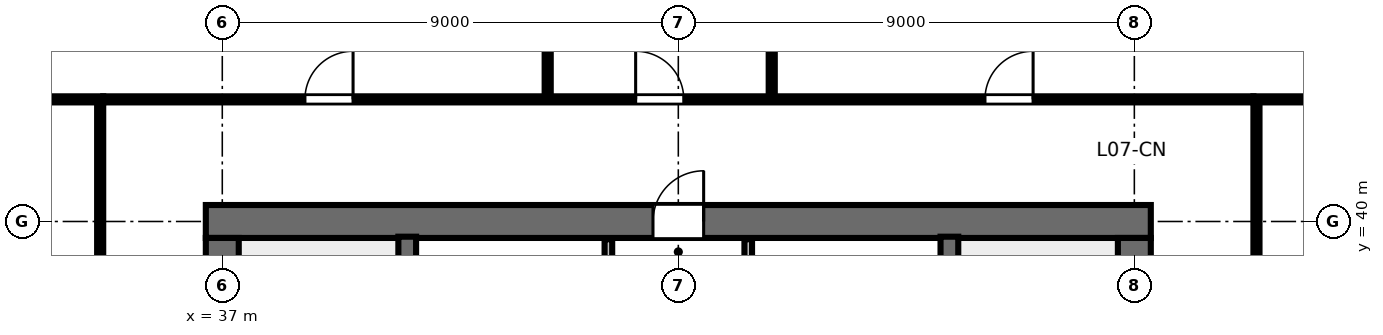
"""IFC4 building model, lengths in metres.
Left out: names, types, materials, properties, quantities, classifications, styles, units other than length and angle.
Written with IfcOpenShell. Run it as: python <this file> out.ifc"""

import sys

from ifc_helpers import new_model, si_unit, direction, frame, frame_2d, origin, place, context, subcontext, project, spatial, rectangle, extrude, element, fill, save


model = new_model("IFC4")
c1 = context("Model", 3, precision=1e-05, world=origin(), true_north=direction((0.0, 1.0)))
c2 = subcontext(c1, "Body", "Model", "MODEL_VIEW")
j1 = project(units=[si_unit("LENGTHUNIT", "METRE"), si_unit("PLANEANGLEUNIT", "RADIAN")], contexts=[c1])
p1 = place(None, origin())
s1 = spatial("IfcSite", under=j1, at=p1, CompositionType="ELEMENT")
p2 = place(p1, origin())
s2 = spatial("IfcBuilding", under=s1, at=p2, CompositionType="ELEMENT")
p3 = place(p2, frame((0.0, 0.0, 31.6)))
s3 = spatial("IfcBuildingStorey", under=s2, at=p3, CompositionType="ELEMENT", Elevation=31.6)
p4 = place(p3, frame((36.675, 40.0, 0.0), z_axis=(0.0, 0.0, 1.0), x_axis=(1.0, 0.0, 0.0)))
e1 = element("IfcWall", 1, at=p4, inside=s3, PredefinedType="SHEAR", context=c2, shape_type="SweptSolid", body=[
    extrude(rectangle(XDim=18.65, YDim=0.65, at=frame_2d((9.325, 0.0))), origin(), (0.0, 0.0, 1.0), 3.36),
])
p5 = place(p4, frame((8.825, 0.0, 0.0)))
e2 = element("IfcOpeningElement", 2, at=p5, cuts=e1, PredefinedType="OPENING", context=c2, shape_type="SweptSolid", body=[
    extrude(rectangle(XDim=1.0, YDim=2.15, at=frame_2d((0.5, 1.075))), frame((0.0, 0.335, 0.0), z_axis=(0.0, -1.0, 0.0), x_axis=(1.0, 0.0, 0.0)), (0.0, 0.0, 1.0), 0.67),
])
p6 = place(p3, frame((37.0, 24.325, 0.0), z_axis=(0.0, 0.0, 1.0), x_axis=(0.0, 1.0, 0.0)))
e3 = element("IfcWall", 3, at=p6, inside=s3, PredefinedType="SHEAR", context=c2, shape_type="SweptSolid", body=[
    extrude(rectangle(XDim=15.35, YDim=0.65, at=frame_2d((7.675, 0.0))), origin(), (0.0, 0.0, 1.0), 3.36),
])
p7 = place(p6, frame((5.2, 0.0, 0.0)))
e4 = element("IfcOpeningElement", 4, at=p7, cuts=e3, PredefinedType="OPENING", context=c2, shape_type="SweptSolid", body=[
    extrude(rectangle(XDim=1.15, YDim=2.15, at=frame_2d((0.575, 1.075))), frame((0.0, 0.335, 0.0), z_axis=(0.0, -1.0, 0.0), x_axis=(1.0, 0.0, 0.0)), (0.0, 0.0, 1.0), 0.67),
])
p8 = place(p3, frame((55.0, 24.325, 0.0), z_axis=(0.0, 0.0, 1.0), x_axis=(0.0, 1.0, 0.0)))
e5 = element("IfcWall", 5, at=p8, inside=s3, PredefinedType="SHEAR", context=c2, shape_type="SweptSolid", body=[
    extrude(rectangle(XDim=15.35, YDim=0.65, at=frame_2d((7.675, 0.0))), origin(), (0.0, 0.0, 1.0), 3.36),
])
p9 = place(p8, frame((5.2, 0.0, 0.0)))
e6 = element("IfcOpeningElement", 6, at=p9, cuts=e5, PredefinedType="OPENING", context=c2, shape_type="SweptSolid", body=[
    extrude(rectangle(XDim=1.15, YDim=2.15, at=frame_2d((0.575, 1.075))), frame((0.0, 0.335, 0.0), z_axis=(0.0, -1.0, 0.0), x_axis=(1.0, 0.0, 0.0)), (0.0, 0.0, 1.0), 0.67),
])
for number, where, z_axis, x_axis in (
    (7, (40.65, 32.0, 0.0), (0.0, 0.0, 1.0), (0.0, 1.0, 0.0)),
    (8, (51.35, 32.0, 0.0), (0.0, 0.0, 1.0), (0.0, 1.0, 0.0)),
):
    element("IfcWall", number, at=place(p3, frame(where, z_axis=z_axis, x_axis=x_axis)), inside=s3, PredefinedType="SHEAR", context=c2, shape_type="SweptSolid", body=[
        extrude(rectangle(XDim=7.7, YDim=0.35, at=frame_2d((3.85, 0.0))), origin(), (0.0, 0.0, 1.0), 3.6),
    ])
p10 = place(p3, frame((44.62, 35.72, 0.0), z_axis=(0.0, 0.0, 1.0), x_axis=(0.0, 1.0, 0.0)))
e9 = element("IfcWall", 9, at=p10, inside=s3, PredefinedType="PARTITIONING", context=c2, shape_type="SweptSolid", body=[
    extrude(rectangle(XDim=3.93, YDim=0.15, at=frame_2d((1.965, 0.0))), origin(), (0.0, 0.0, 1.0), 3.15),
])
p11 = place(p10, frame((1.5, 0.0, 0.0)))
e10 = element("IfcOpeningElement", 10, at=p11, cuts=e9, PredefinedType="OPENING", context=c2, shape_type="SweptSolid", body=[
    extrude(rectangle(XDim=0.9, YDim=2.15, at=frame_2d((0.45, 1.075))), frame((0.0, 0.085, 0.0), z_axis=(0.0, -1.0, 0.0), x_axis=(1.0, 0.0, 0.0)), (0.0, 0.0, 1.0), 0.17),
])
p12 = place(p3, frame((47.38, 35.72, 0.0), z_axis=(0.0, 0.0, 1.0), x_axis=(0.0, 1.0, 0.0)))
e11 = element("IfcWall", 11, at=p12, inside=s3, PredefinedType="PARTITIONING", context=c2, shape_type="SweptSolid", body=[
    extrude(rectangle(XDim=3.93, YDim=0.15, at=frame_2d((1.965, 0.0))), origin(), (0.0, 0.0, 1.0), 3.15),
])
p13 = place(p12, frame((1.5, 0.0, 0.0)))
e12 = element("IfcOpeningElement", 12, at=p13, cuts=e11, PredefinedType="OPENING", context=c2, shape_type="SweptSolid", body=[
    extrude(rectangle(XDim=0.9, YDim=2.15, at=frame_2d((0.45, 1.075))), frame((0.0, 0.085, 0.0), z_axis=(0.0, -1.0, 0.0), x_axis=(1.0, 0.0, 0.0)), (0.0, 0.0, 1.0), 0.17),
])
p14 = place(p3, frame((43.422, 42.41, 0.0), z_axis=(0.0, 0.0, 1.0), x_axis=(0.0, 1.0, 0.0)))
e13 = element("IfcWall", 13, at=p14, inside=s3, PredefinedType="PARTITIONING", context=c2, shape_type="SweptSolid", body=[
    extrude(rectangle(XDim=10.21, YDim=0.12, at=frame_2d((5.105, 0.0))), origin(), (0.0, 0.0, 1.0), 2.43),
])
p15 = place(p14, frame((1.4, 0.0, 0.0)))
e14 = element("IfcOpeningElement", 14, at=p15, cuts=e13, PredefinedType="OPENING", context=c2, shape_type="SweptSolid", body=[
    extrude(rectangle(XDim=0.9, YDim=2.15, at=frame_2d((0.45, 1.075))), frame((0.0, 0.07, 0.0), z_axis=(0.0, -1.0, 0.0), x_axis=(1.0, 0.0, 0.0)), (0.0, 0.0, 1.0), 0.14),
])
p16 = place(p3, frame((47.844, 42.41, 0.0), z_axis=(0.0, 0.0, 1.0), x_axis=(0.0, 1.0, 0.0)))
e15 = element("IfcWall", 15, at=p16, inside=s3, PredefinedType="PARTITIONING", context=c2, shape_type="SweptSolid", body=[
    extrude(rectangle(XDim=10.21, YDim=0.12, at=frame_2d((5.105, 0.0))), origin(), (0.0, 0.0, 1.0), 2.43),
])
p17 = place(p16, frame((1.4, 0.0, 0.0)))
e16 = element("IfcOpeningElement", 16, at=p17, cuts=e15, PredefinedType="OPENING", context=c2, shape_type="SweptSolid", body=[
    extrude(rectangle(XDim=0.9, YDim=2.15, at=frame_2d((0.45, 1.075))), frame((0.0, 0.07, 0.0), z_axis=(0.0, -1.0, 0.0), x_axis=(1.0, 0.0, 0.0)), (0.0, 0.0, 1.0), 0.14),
])
p18 = place(p3, frame((34.65, 42.41, 0.0), z_axis=(0.0, 0.0, 1.0), x_axis=(1.0, 0.0, 0.0)))
e17 = element("IfcWall", 17, at=p18, inside=s3, PredefinedType="PARTITIONING", context=c2, shape_type="SweptSolid", body=[
    extrude(rectangle(XDim=22.7, YDim=0.12, at=frame_2d((11.35, 0.0))), origin(), (0.0, 0.0, 1.0), 2.43),
])
p19 = place(p18, frame((3.981, 0.0, 0.0)))
e18 = element("IfcOpeningElement", 18, at=p19, cuts=e17, PredefinedType="OPENING", context=c2, shape_type="SweptSolid", body=[
    extrude(rectangle(XDim=0.95, YDim=2.15, at=frame_2d((0.475, 1.075))), frame((0.0, 0.07, 0.0), z_axis=(0.0, -1.0, 0.0), x_axis=(1.0, 0.0, 0.0)), (0.0, 0.0, 1.0), 0.14),
])
p20 = place(p18, frame((10.508, 0.0, 0.0)))
e19 = element("IfcOpeningElement", 19, at=p20, cuts=e17, PredefinedType="OPENING", context=c2, shape_type="SweptSolid", body=[
    extrude(rectangle(XDim=0.95, YDim=2.15, at=frame_2d((0.475, 1.075))), frame((0.0, 0.07, 0.0), z_axis=(0.0, -1.0, 0.0), x_axis=(1.0, 0.0, 0.0)), (0.0, 0.0, 1.0), 0.14),
])
p21 = place(p18, frame((17.402, 0.0, 0.0)))
e20 = element("IfcOpeningElement", 20, at=p21, cuts=e17, PredefinedType="OPENING", context=c2, shape_type="SweptSolid", body=[
    extrude(rectangle(XDim=0.95, YDim=2.15, at=frame_2d((0.475, 1.075))), frame((0.0, 0.07, 0.0), z_axis=(0.0, -1.0, 0.0), x_axis=(1.0, 0.0, 0.0)), (0.0, 0.0, 1.0), 0.14),
])
p22 = place(p3, frame((34.59, 21.65, 0.0), z_axis=(0.0, 0.0, 1.0), x_axis=(0.0, 1.0, 0.0)))
e21 = element("IfcWall", 21, at=p22, inside=s3, PredefinedType="PARTITIONING", context=c2, shape_type="SweptSolid", body=[
    extrude(rectangle(XDim=20.7, YDim=0.12, at=frame_2d((10.35, 0.0))), origin(), (0.0, 0.0, 1.0), 2.43),
])
p23 = place(p22, frame((3.161, 0.0, 0.0)))
e22 = element("IfcOpeningElement", 22, at=p23, cuts=e21, PredefinedType="OPENING", context=c2, shape_type="SweptSolid", body=[
    extrude(rectangle(XDim=0.95, YDim=2.15, at=frame_2d((0.475, 1.075))), frame((0.0, 0.07, 0.0), z_axis=(0.0, -1.0, 0.0), x_axis=(1.0, 0.0, 0.0)), (0.0, 0.0, 1.0), 0.14),
])
p24 = place(p22, frame((13.311, 0.0, 0.0)))
e23 = element("IfcOpeningElement", 23, at=p24, cuts=e21, PredefinedType="OPENING", context=c2, shape_type="SweptSolid", body=[
    extrude(rectangle(XDim=0.95, YDim=2.15, at=frame_2d((0.475, 1.075))), frame((0.0, 0.07, 0.0), z_axis=(0.0, -1.0, 0.0), x_axis=(1.0, 0.0, 0.0)), (0.0, 0.0, 1.0), 0.14),
])
p25 = place(p3, frame((57.41, 21.65, 0.0), z_axis=(0.0, 0.0, 1.0), x_axis=(0.0, 1.0, 0.0)))
e24 = element("IfcWall", 24, at=p25, inside=s3, PredefinedType="PARTITIONING", context=c2, shape_type="SweptSolid", body=[
    extrude(rectangle(XDim=20.7, YDim=0.12, at=frame_2d((10.35, 0.0))), origin(), (0.0, 0.0, 1.0), 2.43),
])
p26 = place(p25, frame((5.31, 0.0, 0.0)))
e25 = element("IfcOpeningElement", 25, at=p26, cuts=e24, PredefinedType="OPENING", context=c2, shape_type="SweptSolid", body=[
    extrude(rectangle(XDim=0.95, YDim=2.15, at=frame_2d((0.475, 1.075))), frame((0.0, 0.07, 0.0), z_axis=(0.0, -1.0, 0.0), x_axis=(1.0, 0.0, 0.0)), (0.0, 0.0, 1.0), 0.14),
])
p27 = place(p25, frame((15.459, 0.0, 0.0)))
e26 = element("IfcOpeningElement", 26, at=p27, cuts=e24, PredefinedType="OPENING", context=c2, shape_type="SweptSolid", body=[
    extrude(rectangle(XDim=0.95, YDim=2.15, at=frame_2d((0.475, 1.075))), frame((0.0, 0.07, 0.0), z_axis=(0.0, -1.0, 0.0), x_axis=(1.0, 0.0, 0.0)), (0.0, 0.0, 1.0), 0.14),
])
for number, where, z_axis, x_axis in (
    (27, (34.65, 42.41, 0.0), (0.0, 0.0, 1.0), (-1.0, 0.0, 0.0)),
    (28, (57.35, 42.41, 0.0), (0.0, 0.0, 1.0), (1.0, 0.0, 0.0)),
):
    element("IfcWall", number, at=place(p3, frame(where, z_axis=z_axis, x_axis=x_axis)), inside=s3, PredefinedType="PARTITIONING", context=c2, shape_type="SweptSolid", body=[
        extrude(rectangle(XDim=12.07, YDim=0.12, at=frame_2d((6.035, 0.0))), origin(), (0.0, 0.0, 1.0), 2.43),
    ])
p28 = place(p5, origin())
e29 = element("IfcDoor", 29, at=p28, inside=s3, OperationType="SINGLE_SWING_RIGHT", PredefinedType="DOOR", context=c2, shape_type="SweptSolid", body=[
    extrude(rectangle(XDim=1.0, YDim=2.15, at=frame_2d((0.5, 1.075))), frame((0.0, 0.025, 0.0), z_axis=(0.0, -1.0, 0.0), x_axis=(1.0, 0.0, 0.0)), (0.0, 0.0, 1.0), 0.05),
])
fill(e2, e29)
p29 = place(p19, origin())
e30 = element("IfcDoor", 30, at=p29, inside=s3, OperationType="SINGLE_SWING_RIGHT", PredefinedType="DOOR", context=c2, shape_type="SweptSolid", body=[
    extrude(rectangle(XDim=0.95, YDim=2.15, at=frame_2d((0.475, 1.075))), frame((0.0, 0.025, 0.0), z_axis=(0.0, -1.0, 0.0), x_axis=(1.0, 0.0, 0.0)), (0.0, 0.0, 1.0), 0.05),
])
fill(e18, e30)
p30 = place(p20, origin())
e31 = element("IfcDoor", 31, at=p30, inside=s3, OperationType="SINGLE_SWING_LEFT", PredefinedType="DOOR", context=c2, shape_type="SweptSolid", body=[
    extrude(rectangle(XDim=0.95, YDim=2.15, at=frame_2d((0.475, 1.075))), frame((0.0, 0.025, 0.0), z_axis=(0.0, -1.0, 0.0), x_axis=(1.0, 0.0, 0.0)), (0.0, 0.0, 1.0), 0.05),
])
fill(e19, e31)
p31 = place(p21, origin())
e32 = element("IfcDoor", 32, at=p31, inside=s3, OperationType="SINGLE_SWING_RIGHT", PredefinedType="DOOR", context=c2, shape_type="SweptSolid", body=[
    extrude(rectangle(XDim=0.95, YDim=2.15, at=frame_2d((0.475, 1.075))), frame((0.0, 0.025, 0.0), z_axis=(0.0, -1.0, 0.0), x_axis=(1.0, 0.0, 0.0)), (0.0, 0.0, 1.0), 0.05),
])
fill(e20, e32)
save(model, sys.argv[1])
